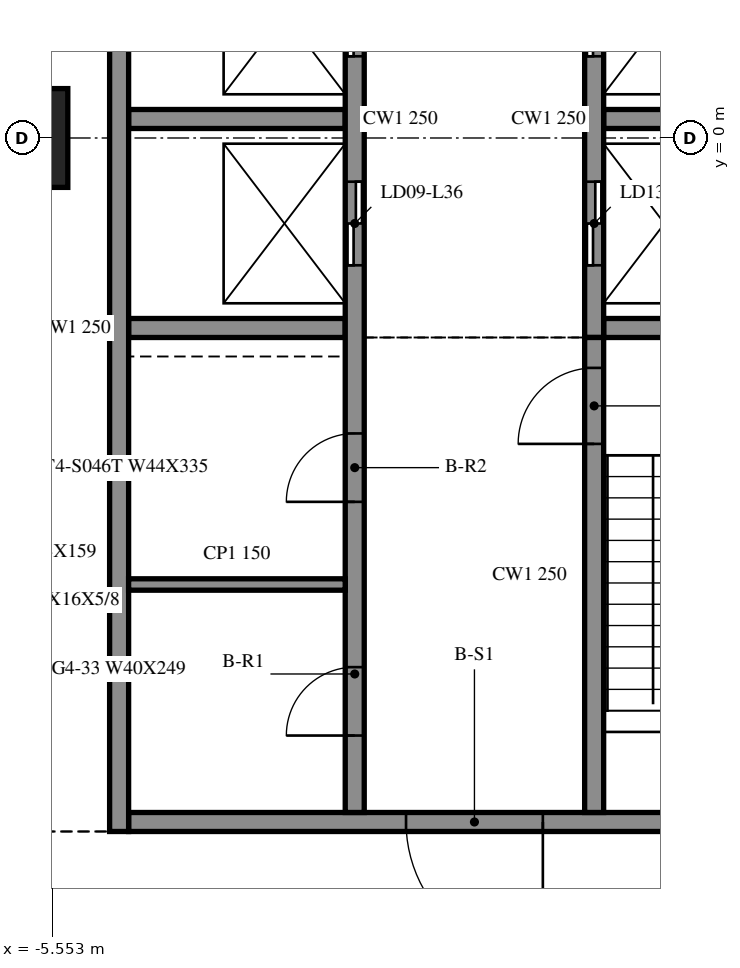
"""IFC4 building model, lengths in metres.
Left out: names, types, materials, properties, quantities, classifications, styles, units other than length and angle.
Written with IfcOpenShell. Run it as: python <this file> out.ifc"""

import sys

from ifc_helpers import new_model, si_unit, direction, frame, frame_2d, origin, origin_2d, place, context, subcontext, project, spatial, rectangle, extrude, element, fill, save


model = new_model("IFC4")
c1 = context("Model", 3, precision=1e-05, world=origin(), true_north=direction((0.0, 1.0)))
c2 = subcontext(c1, "Body", "Model", "MODEL_VIEW")
j1 = project(units=[si_unit("LENGTHUNIT", "METRE"), si_unit("PLANEANGLEUNIT", "RADIAN")], contexts=[c1])
p1 = place(None, origin())
s1 = spatial("IfcSite", under=j1, at=p1, CompositionType="ELEMENT")
p2 = place(p1, origin())
s2 = spatial("IfcBuilding", under=s1, at=p2, CompositionType="ELEMENT")
p3 = place(p2, frame((0.0, 0.0, 154.8)))
s3 = spatial("IfcBuildingStorey", under=s2, at=p3, CompositionType="ELEMENT", Elevation=154.8)
p4 = place(p3, frame((-6.0, 0.0, -0.55), z_axis=(0.0, 0.0, 1.0), x_axis=(1.0, 0.0, 0.0)))
e1 = element("IfcColumn", 1, at=p4, inside=s3, PredefinedType="COLUMN", context=c2, shape_type="SweptSolid", body=[
    extrude(rectangle(XDim=1.3, YDim=1.3, at=origin_2d()), origin(), (0.0, 0.0, 1.0), 4.61),
])
p5 = place(p3, frame((-4.675, 15.125, 0.0), z_axis=(0.0, 0.0, 1.0), x_axis=(0.0, -1.0, 0.0)))
e2 = element("IfcWall", 2, at=p5, inside=s3, PredefinedType="SOLIDWALL", context=c2, shape_type="SweptSolid", body=[
    extrude(rectangle(XDim=24.25, YDim=0.25, at=frame_2d((12.125, 0.0))), origin(), (0.0, 0.0, 1.0), 4.06),
])
p6 = place(p3, frame((4.55, -9.0, 0.0), z_axis=(0.0, 0.0, 1.0), x_axis=(-1.0, 0.0, 0.0)))
e3 = element("IfcWall", 3, at=p6, inside=s3, PredefinedType="SOLIDWALL", context=c2, shape_type="SweptSolid", body=[
    extrude(rectangle(XDim=9.1, YDim=0.25, at=frame_2d((4.55, 0.0))), origin(), (0.0, 0.0, 1.0), 4.06),
])
p7 = place(p6, frame((3.65, 0.0, 0.0)))
e4 = element("IfcOpeningElement", 4, at=p7, cuts=e3, PredefinedType="OPENING", context=c2, shape_type="SweptSolid", body=[
    extrude(rectangle(XDim=1.8, YDim=2.1, at=frame_2d((0.9, 1.05))), frame((0.0, 0.135, 0.0), z_axis=(0.0, -1.0, 0.0), x_axis=(1.0, 0.0, 0.0)), (0.0, 0.0, 1.0), 0.27),
])
p8 = place(p3, frame((-1.575, -8.875, 0.0), z_axis=(0.0, 0.0, 1.0), x_axis=(0.0, 1.0, 0.0)))
e5 = element("IfcWall", 5, at=p8, inside=s3, PredefinedType="SOLIDWALL", context=c2, shape_type="SweptSolid", body=[
    extrude(rectangle(XDim=23.75, YDim=0.25, at=frame_2d((11.875, 0.0))), origin(), (0.0, 0.0, 1.0), 4.06),
])
p9 = place(p8, frame((7.2, 0.0, 0.0)))
e6 = element("IfcOpeningElement", 6, at=p9, cuts=e5, PredefinedType="OPENING", context=c2, shape_type="SweptSolid", body=[
    extrude(rectangle(XDim=1.1, YDim=2.1, at=frame_2d((0.55, 1.05))), frame((0.0, 0.135, 0.0), z_axis=(0.0, -1.0, 0.0), x_axis=(1.0, 0.0, 0.0)), (0.0, 0.0, 1.0), 0.27),
])
p10 = place(p8, frame((9.95, 0.0, 0.0)))
e7 = element("IfcOpeningElement", 7, at=p10, cuts=e5, PredefinedType="OPENING", context=c2, shape_type="SweptSolid", body=[
    extrude(rectangle(XDim=1.1, YDim=2.1, at=frame_2d((0.55, 1.05))), frame((0.0, 0.135, 0.0), z_axis=(0.0, -1.0, 0.0), x_axis=(1.0, 0.0, 0.0)), (0.0, 0.0, 1.0), 0.27),
])
p11 = place(p8, frame((12.7, 0.0, 0.0)))
e8 = element("IfcOpeningElement", 8, at=p11, cuts=e5, PredefinedType="OPENING", context=c2, shape_type="SweptSolid", body=[
    extrude(rectangle(XDim=1.1, YDim=2.1, at=frame_2d((0.55, 1.05))), frame((0.0, 0.135, 0.0), z_axis=(0.0, -1.0, 0.0), x_axis=(1.0, 0.0, 0.0)), (0.0, 0.0, 1.0), 0.27),
])
p12 = place(p8, frame((15.45, 0.0, 0.0)))
e9 = element("IfcOpeningElement", 9, at=p12, cuts=e5, PredefinedType="OPENING", context=c2, shape_type="SweptSolid", body=[
    extrude(rectangle(XDim=1.1, YDim=2.1, at=frame_2d((0.55, 1.05))), frame((0.0, 0.135, 0.0), z_axis=(0.0, -1.0, 0.0), x_axis=(1.0, 0.0, 0.0)), (0.0, 0.0, 1.0), 0.27),
])
p13 = place(p8, frame((1.012, 0.0, 0.0)))
e10 = element("IfcOpeningElement", 10, at=p13, cuts=e5, PredefinedType="OPENING", context=c2, shape_type="SweptSolid", body=[
    extrude(rectangle(XDim=0.9, YDim=2.1, at=frame_2d((0.45, 1.05))), frame((0.0, 0.135, 0.0), z_axis=(0.0, -1.0, 0.0), x_axis=(1.0, 0.0, 0.0)), (0.0, 0.0, 1.0), 0.27),
])
p14 = place(p8, frame((4.087, 0.0, 0.0)))
e11 = element("IfcOpeningElement", 11, at=p14, cuts=e5, PredefinedType="OPENING", context=c2, shape_type="SweptSolid", body=[
    extrude(rectangle(XDim=0.9, YDim=2.1, at=frame_2d((0.45, 1.05))), frame((0.0, 0.135, 0.0), z_axis=(0.0, -1.0, 0.0), x_axis=(1.0, 0.0, 0.0)), (0.0, 0.0, 1.0), 0.27),
])
p15 = place(p8, frame((18.262, 0.0, 0.0)))
e12 = element("IfcOpeningElement", 12, at=p15, cuts=e5, PredefinedType="OPENING", context=c2, shape_type="SweptSolid", body=[
    extrude(rectangle(XDim=0.9, YDim=2.1, at=frame_2d((0.45, 1.05))), frame((0.0, 0.135, 0.0), z_axis=(0.0, -1.0, 0.0), x_axis=(1.0, 0.0, 0.0)), (0.0, 0.0, 1.0), 0.27),
])
p16 = place(p8, frame((20.3, 0.0, 0.0)))
e13 = element("IfcOpeningElement", 13, at=p16, cuts=e5, PredefinedType="OPENING", context=c2, shape_type="SweptSolid", body=[
    extrude(rectangle(XDim=0.9, YDim=2.1, at=frame_2d((0.45, 1.05))), frame((0.0, 0.135, 0.0), z_axis=(0.0, -1.0, 0.0), x_axis=(1.0, 0.0, 0.0)), (0.0, 0.0, 1.0), 0.27),
])
p17 = place(p8, frame((22.337, 0.0, 0.0)))
e14 = element("IfcOpeningElement", 14, at=p17, cuts=e5, PredefinedType="OPENING", context=c2, shape_type="SweptSolid", body=[
    extrude(rectangle(XDim=0.9, YDim=2.1, at=frame_2d((0.45, 1.05))), frame((0.0, 0.135, 0.0), z_axis=(0.0, -1.0, 0.0), x_axis=(1.0, 0.0, 0.0)), (0.0, 0.0, 1.0), 0.27),
])
p18 = place(p3, frame((1.575, -8.875, 0.0), z_axis=(0.0, 0.0, 1.0), x_axis=(0.0, 1.0, 0.0)))
e15 = element("IfcWall", 15, at=p18, inside=s3, PredefinedType="SOLIDWALL", context=c2, shape_type="SweptSolid", body=[
    extrude(rectangle(XDim=6.25, YDim=0.25, at=frame_2d((3.125, 0.0))), origin(), (0.0, 0.0, 1.0), 4.06),
])
p19 = place(p18, frame((4.85, 0.0, 0.0)))
e16 = element("IfcOpeningElement", 16, at=p19, cuts=e15, PredefinedType="OPENING", context=c2, shape_type="SweptSolid", body=[
    extrude(rectangle(XDim=1.0, YDim=2.1, at=frame_2d((0.5, 1.05))), frame((0.0, 0.135, 0.0), z_axis=(0.0, -1.0, 0.0), x_axis=(1.0, 0.0, 0.0)), (0.0, 0.0, 1.0), 0.27),
])
p20 = place(p3, frame((1.575, 14.875, 0.0), z_axis=(0.0, 0.0, 1.0), x_axis=(0.0, -1.0, 0.0)))
e17 = element("IfcWall", 17, at=p20, inside=s3, PredefinedType="SOLIDWALL", context=c2, shape_type="SweptSolid", body=[
    extrude(rectangle(XDim=17.5, YDim=0.25, at=frame_2d((8.75, 0.0))), origin(), (0.0, 0.0, 1.0), 4.06),
])
p21 = place(p20, frame((15.45, 0.0, 0.0)))
e18 = element("IfcOpeningElement", 18, at=p21, cuts=e17, PredefinedType="OPENING", context=c2, shape_type="SweptSolid", body=[
    extrude(rectangle(XDim=1.1, YDim=2.1, at=frame_2d((0.55, 1.05))), frame((0.0, 0.135, 0.0), z_axis=(0.0, -1.0, 0.0), x_axis=(1.0, 0.0, 0.0)), (0.0, 0.0, 1.0), 0.27),
])
p22 = place(p20, frame((12.7, 0.0, 0.0)))
e19 = element("IfcOpeningElement", 19, at=p22, cuts=e17, PredefinedType="OPENING", context=c2, shape_type="SweptSolid", body=[
    extrude(rectangle(XDim=1.1, YDim=2.1, at=frame_2d((0.55, 1.05))), frame((0.0, 0.135, 0.0), z_axis=(0.0, -1.0, 0.0), x_axis=(1.0, 0.0, 0.0)), (0.0, 0.0, 1.0), 0.27),
])
p23 = place(p20, frame((9.95, 0.0, 0.0)))
e20 = element("IfcOpeningElement", 20, at=p23, cuts=e17, PredefinedType="OPENING", context=c2, shape_type="SweptSolid", body=[
    extrude(rectangle(XDim=1.1, YDim=2.1, at=frame_2d((0.55, 1.05))), frame((0.0, 0.135, 0.0), z_axis=(0.0, -1.0, 0.0), x_axis=(1.0, 0.0, 0.0)), (0.0, 0.0, 1.0), 0.27),
])
p24 = place(p20, frame((7.2, 0.0, 0.0)))
e21 = element("IfcOpeningElement", 21, at=p24, cuts=e17, PredefinedType="OPENING", context=c2, shape_type="SweptSolid", body=[
    extrude(rectangle(XDim=1.1, YDim=2.1, at=frame_2d((0.55, 1.05))), frame((0.0, 0.135, 0.0), z_axis=(0.0, -1.0, 0.0), x_axis=(1.0, 0.0, 0.0)), (0.0, 0.0, 1.0), 0.27),
])
p25 = place(p20, frame((4.587, 0.0, 0.0)))
e22 = element("IfcOpeningElement", 22, at=p25, cuts=e17, PredefinedType="OPENING", context=c2, shape_type="SweptSolid", body=[
    extrude(rectangle(XDim=0.9, YDim=2.1, at=frame_2d((0.45, 1.05))), frame((0.0, 0.135, 0.0), z_axis=(0.0, -1.0, 0.0), x_axis=(1.0, 0.0, 0.0)), (0.0, 0.0, 1.0), 0.27),
])
p26 = place(p20, frame((2.55, 0.0, 0.0)))
e23 = element("IfcOpeningElement", 23, at=p26, cuts=e17, PredefinedType="OPENING", context=c2, shape_type="SweptSolid", body=[
    extrude(rectangle(XDim=0.9, YDim=2.1, at=frame_2d((0.45, 1.05))), frame((0.0, 0.135, 0.0), z_axis=(0.0, -1.0, 0.0), x_axis=(1.0, 0.0, 0.0)), (0.0, 0.0, 1.0), 0.27),
])
p27 = place(p20, frame((0.512, 0.0, 0.0)))
e24 = element("IfcOpeningElement", 24, at=p27, cuts=e17, PredefinedType="OPENING", context=c2, shape_type="SweptSolid", body=[
    extrude(rectangle(XDim=0.9, YDim=2.1, at=frame_2d((0.45, 1.05))), frame((0.0, 0.135, 0.0), z_axis=(0.0, -1.0, 0.0), x_axis=(1.0, 0.0, 0.0)), (0.0, 0.0, 1.0), 0.27),
])
for number, where, z_axis, x_axis in (
    (25, (-4.55, -2.5, 0.0), (0.0, 0.0, 1.0), (1.0, 0.0, 0.0)),
    (26, (-4.55, 0.25, 0.0), (0.0, 0.0, 1.0), (1.0, 0.0, 0.0)),
    (27, (1.7, -2.5, 0.0), (0.0, 0.0, 1.0), (1.0, 0.0, 0.0)),
    (28, (1.7, 0.25, 0.0), (0.0, 0.0, 1.0), (1.0, 0.0, 0.0)),
):
    element("IfcWall", number, at=place(p3, frame(where, z_axis=z_axis, x_axis=x_axis)), inside=s3, PredefinedType="SOLIDWALL", context=c2, shape_type="SweptSolid", body=[
        extrude(rectangle(XDim=2.85, YDim=0.25, at=frame_2d((1.425, 0.0))), origin(), (0.0, 0.0, 1.0), 4.06),
    ])
p28 = place(p3, frame((-4.55, -5.875, 0.0), z_axis=(0.0, 0.0, 1.0), x_axis=(1.0, 0.0, 0.0)))
e29 = element("IfcWall", 29, at=p28, inside=s3, PredefinedType="PARTITIONING", context=c2, shape_type="SweptSolid", body=[
    extrude(rectangle(XDim=2.85, YDim=0.15, at=frame_2d((1.425, 0.0))), origin(), (0.0, 0.0, 1.0), 4.06),
])
p29 = place(p7, origin())
e30 = element("IfcDoor", 30, at=p29, inside=s3, OperationType="DOUBLE_DOOR_SINGLE_SWING", PredefinedType="DOOR", context=c2, shape_type="SweptSolid", body=[
    extrude(rectangle(XDim=1.8, YDim=2.1, at=frame_2d((0.9, 1.05))), frame((0.0, 0.025, 0.0), z_axis=(0.0, -1.0, 0.0), x_axis=(1.0, 0.0, 0.0)), (0.0, 0.0, 1.0), 0.05),
])
fill(e4, e30)
p30 = place(p21, origin())
e31 = element("IfcDoor", 31, at=p30, inside=s3, OperationType="DOUBLE_DOOR_SLIDING", PredefinedType="DOOR", context=c2, shape_type="SweptSolid", body=[
    extrude(rectangle(XDim=1.1, YDim=2.1, at=frame_2d((0.55, 1.05))), frame((0.0, 0.025, 0.0), z_axis=(0.0, -1.0, 0.0), x_axis=(1.0, 0.0, 0.0)), (0.0, 0.0, 1.0), 0.05),
])
fill(e18, e31)
p31 = place(p22, origin())
e32 = element("IfcDoor", 32, at=p31, inside=s3, OperationType="DOUBLE_DOOR_SLIDING", PredefinedType="DOOR", context=c2, shape_type="SweptSolid", body=[
    extrude(rectangle(XDim=1.1, YDim=2.1, at=frame_2d((0.55, 1.05))), frame((0.0, 0.025, 0.0), z_axis=(0.0, -1.0, 0.0), x_axis=(1.0, 0.0, 0.0)), (0.0, 0.0, 1.0), 0.05),
])
fill(e19, e32)
p32 = place(p9, origin())
e33 = element("IfcDoor", 33, at=p32, inside=s3, OperationType="DOUBLE_DOOR_SLIDING", PredefinedType="DOOR", context=c2, shape_type="SweptSolid", body=[
    extrude(rectangle(XDim=1.1, YDim=2.1, at=frame_2d((0.55, 1.05))), frame((0.0, 0.025, 0.0), z_axis=(0.0, -1.0, 0.0), x_axis=(1.0, 0.0, 0.0)), (0.0, 0.0, 1.0), 0.05),
])
fill(e6, e33)
p33 = place(p10, origin())
e34 = element("IfcDoor", 34, at=p33, inside=s3, OperationType="DOUBLE_DOOR_SLIDING", PredefinedType="DOOR", context=c2, shape_type="SweptSolid", body=[
    extrude(rectangle(XDim=1.1, YDim=2.1, at=frame_2d((0.55, 1.05))), frame((0.0, 0.025, 0.0), z_axis=(0.0, -1.0, 0.0), x_axis=(1.0, 0.0, 0.0)), (0.0, 0.0, 1.0), 0.05),
])
fill(e7, e34)
p34 = place(p13, origin())
e35 = element("IfcDoor", 35, at=p34, inside=s3, OperationType="SINGLE_SWING_LEFT", PredefinedType="DOOR", context=c2, shape_type="SweptSolid", body=[
    extrude(rectangle(XDim=0.9, YDim=2.1, at=frame_2d((0.45, 1.05))), frame((0.0, 0.025, 0.0), z_axis=(0.0, -1.0, 0.0), x_axis=(1.0, 0.0, 0.0)), (0.0, 0.0, 1.0), 0.05),
])
fill(e10, e35)
p35 = place(p14, origin())
e36 = element("IfcDoor", 36, at=p35, inside=s3, OperationType="SINGLE_SWING_RIGHT", PredefinedType="DOOR", context=c2, shape_type="SweptSolid", body=[
    extrude(rectangle(XDim=0.9, YDim=2.1, at=frame_2d((0.45, 1.05))), frame((0.0, 0.025, 0.0), z_axis=(0.0, -1.0, 0.0), x_axis=(1.0, 0.0, 0.0)), (0.0, 0.0, 1.0), 0.05),
])
fill(e11, e36)
p36 = place(p19, origin())
e37 = element("IfcDoor", 37, at=p36, inside=s3, OperationType="SINGLE_SWING_LEFT", PredefinedType="DOOR", context=c2, shape_type="SweptSolid", body=[
    extrude(rectangle(XDim=1.0, YDim=2.1, at=frame_2d((0.5, 1.05))), frame((0.0, 0.025, 0.0), z_axis=(0.0, -1.0, 0.0), x_axis=(1.0, 0.0, 0.0)), (0.0, 0.0, 1.0), 0.05),
])
fill(e16, e37)
save(model, sys.argv[1])
